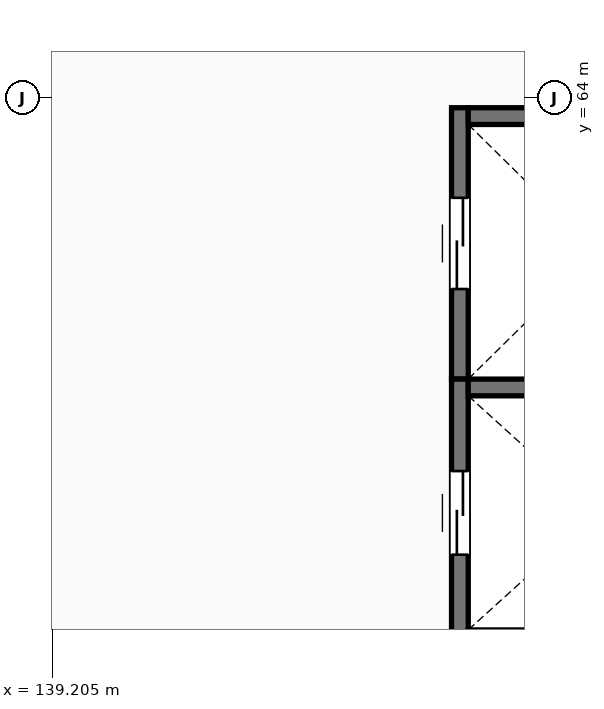
"""IFC4 building model, lengths in metres.
Left out: names, types, materials, properties, quantities, classifications, styles, units other than length and angle.
Written with IfcOpenShell. Run it as: python <this file> out.ifc"""

import sys

from ifc_helpers import new_model, si_unit, direction, frame, frame_2d, origin, place, context, subcontext, project, spatial, rectangle, extrude, element, fill, save


model = new_model("IFC4")
c1 = context("Model", 3, precision=1e-05, world=origin(), true_north=direction((0.0, 1.0)))
c2 = subcontext(c1, "Body", "Model", "MODEL_VIEW")
j1 = project(units=[si_unit("LENGTHUNIT", "METRE"), si_unit("PLANEANGLEUNIT", "RADIAN")], contexts=[c1])
p1 = place(None, origin())
s1 = spatial("IfcSite", under=j1, at=p1, CompositionType="ELEMENT")
p2 = place(p1, origin())
s2 = spatial("IfcBuilding", under=s1, at=p2, CompositionType="ELEMENT")
p3 = place(p2, frame((0.0, 0.0, 12.0)))
s3 = spatial("IfcBuildingStorey", under=s2, at=p3, CompositionType="ELEMENT", Elevation=12.0)
p4 = place(p3, frame((144.57, 60.3, 0.0), z_axis=(0.0, 0.0, 1.0), x_axis=(0.0, 1.0, 0.0)))
e1 = element("IfcWall", 1, at=p4, inside=s3, PredefinedType="SHEAR", context=c2, shape_type="SweptSolid", body=[
    extrude(rectangle(XDim=3.57, YDim=0.22, at=frame_2d((1.785, 0.0))), origin(), (0.0, 0.0, 1.0), 3.6),
])
p5 = place(p4, frame((1.185, 0.0, 0.0)))
e2 = element("IfcOpeningElement", 2, at=p5, cuts=e1, PredefinedType="OPENING", context=c2, shape_type="SweptSolid", body=[
    extrude(rectangle(XDim=1.2, YDim=2.2, at=frame_2d((0.6, 1.1))), frame((0.0, 0.12, 0.0), z_axis=(0.0, -1.0, 0.0), x_axis=(1.0, 0.0, 0.0)), (0.0, 0.0, 1.0), 0.24),
])
p6 = place(p3, frame((144.68, 63.76, 0.0), z_axis=(0.0, 0.0, 1.0), x_axis=(1.0, 0.0, 0.0)))
e3 = element("IfcWall", 3, at=p6, inside=s3, PredefinedType="SHEAR", context=c2, shape_type="SweptSolid", body=[
    extrude(rectangle(XDim=3.4, YDim=0.22, at=frame_2d((1.7, 0.0))), origin(), (0.0, 0.0, 1.0), 3.6),
])
p7 = place(p3, frame((144.57, 56.78, 0.0), z_axis=(0.0, 0.0, 1.0), x_axis=(0.0, 1.0, 0.0)))
e4 = element("IfcWall", 4, at=p7, inside=s3, PredefinedType="SHEAR", context=c2, shape_type="SweptSolid", body=[
    extrude(rectangle(XDim=3.52, YDim=0.22, at=frame_2d((1.76, 0.0))), origin(), (0.0, 0.0, 1.0), 3.6),
])
p8 = place(p7, frame((1.21, 0.0, 0.0)))
e5 = element("IfcOpeningElement", 5, at=p8, cuts=e4, PredefinedType="OPENING", context=c2, shape_type="SweptSolid", body=[
    extrude(rectangle(XDim=1.1, YDim=2.2, at=frame_2d((0.55, 1.1))), frame((0.0, 0.12, 0.0), z_axis=(0.0, -1.0, 0.0), x_axis=(1.0, 0.0, 0.0)), (0.0, 0.0, 1.0), 0.24),
])
p9 = place(p3, frame((144.68, 60.19, 0.0), z_axis=(0.0, 0.0, 1.0), x_axis=(1.0, 0.0, 0.0)))
e6 = element("IfcWall", 6, at=p9, inside=s3, PredefinedType="SHEAR", context=c2, shape_type="SweptSolid", body=[
    extrude(rectangle(XDim=3.4, YDim=0.22, at=frame_2d((1.7, 0.0))), origin(), (0.0, 0.0, 1.0), 3.6),
])
p10 = place(p5, origin())
e7 = element("IfcDoor", 7, at=p10, inside=s3, OperationType="DOUBLE_DOOR_SLIDING", PredefinedType="DOOR", context=c2, shape_type="SweptSolid", body=[
    extrude(rectangle(XDim=1.2, YDim=2.2, at=frame_2d((0.6, 1.1))), frame((0.0, 0.025, 0.0), z_axis=(0.0, -1.0, 0.0), x_axis=(1.0, 0.0, 0.0)), (0.0, 0.0, 1.0), 0.05),
])
fill(e2, e7)
p11 = place(p8, origin())
e8 = element("IfcDoor", 8, at=p11, inside=s3, OperationType="DOUBLE_DOOR_SLIDING", PredefinedType="DOOR", context=c2, shape_type="SweptSolid", body=[
    extrude(rectangle(XDim=1.1, YDim=2.2, at=frame_2d((0.55, 1.1))), frame((0.0, 0.025, 0.0), z_axis=(0.0, -1.0, 0.0), x_axis=(1.0, 0.0, 0.0)), (0.0, 0.0, 1.0), 0.05),
])
fill(e5, e8)
save(model, sys.argv[1])
